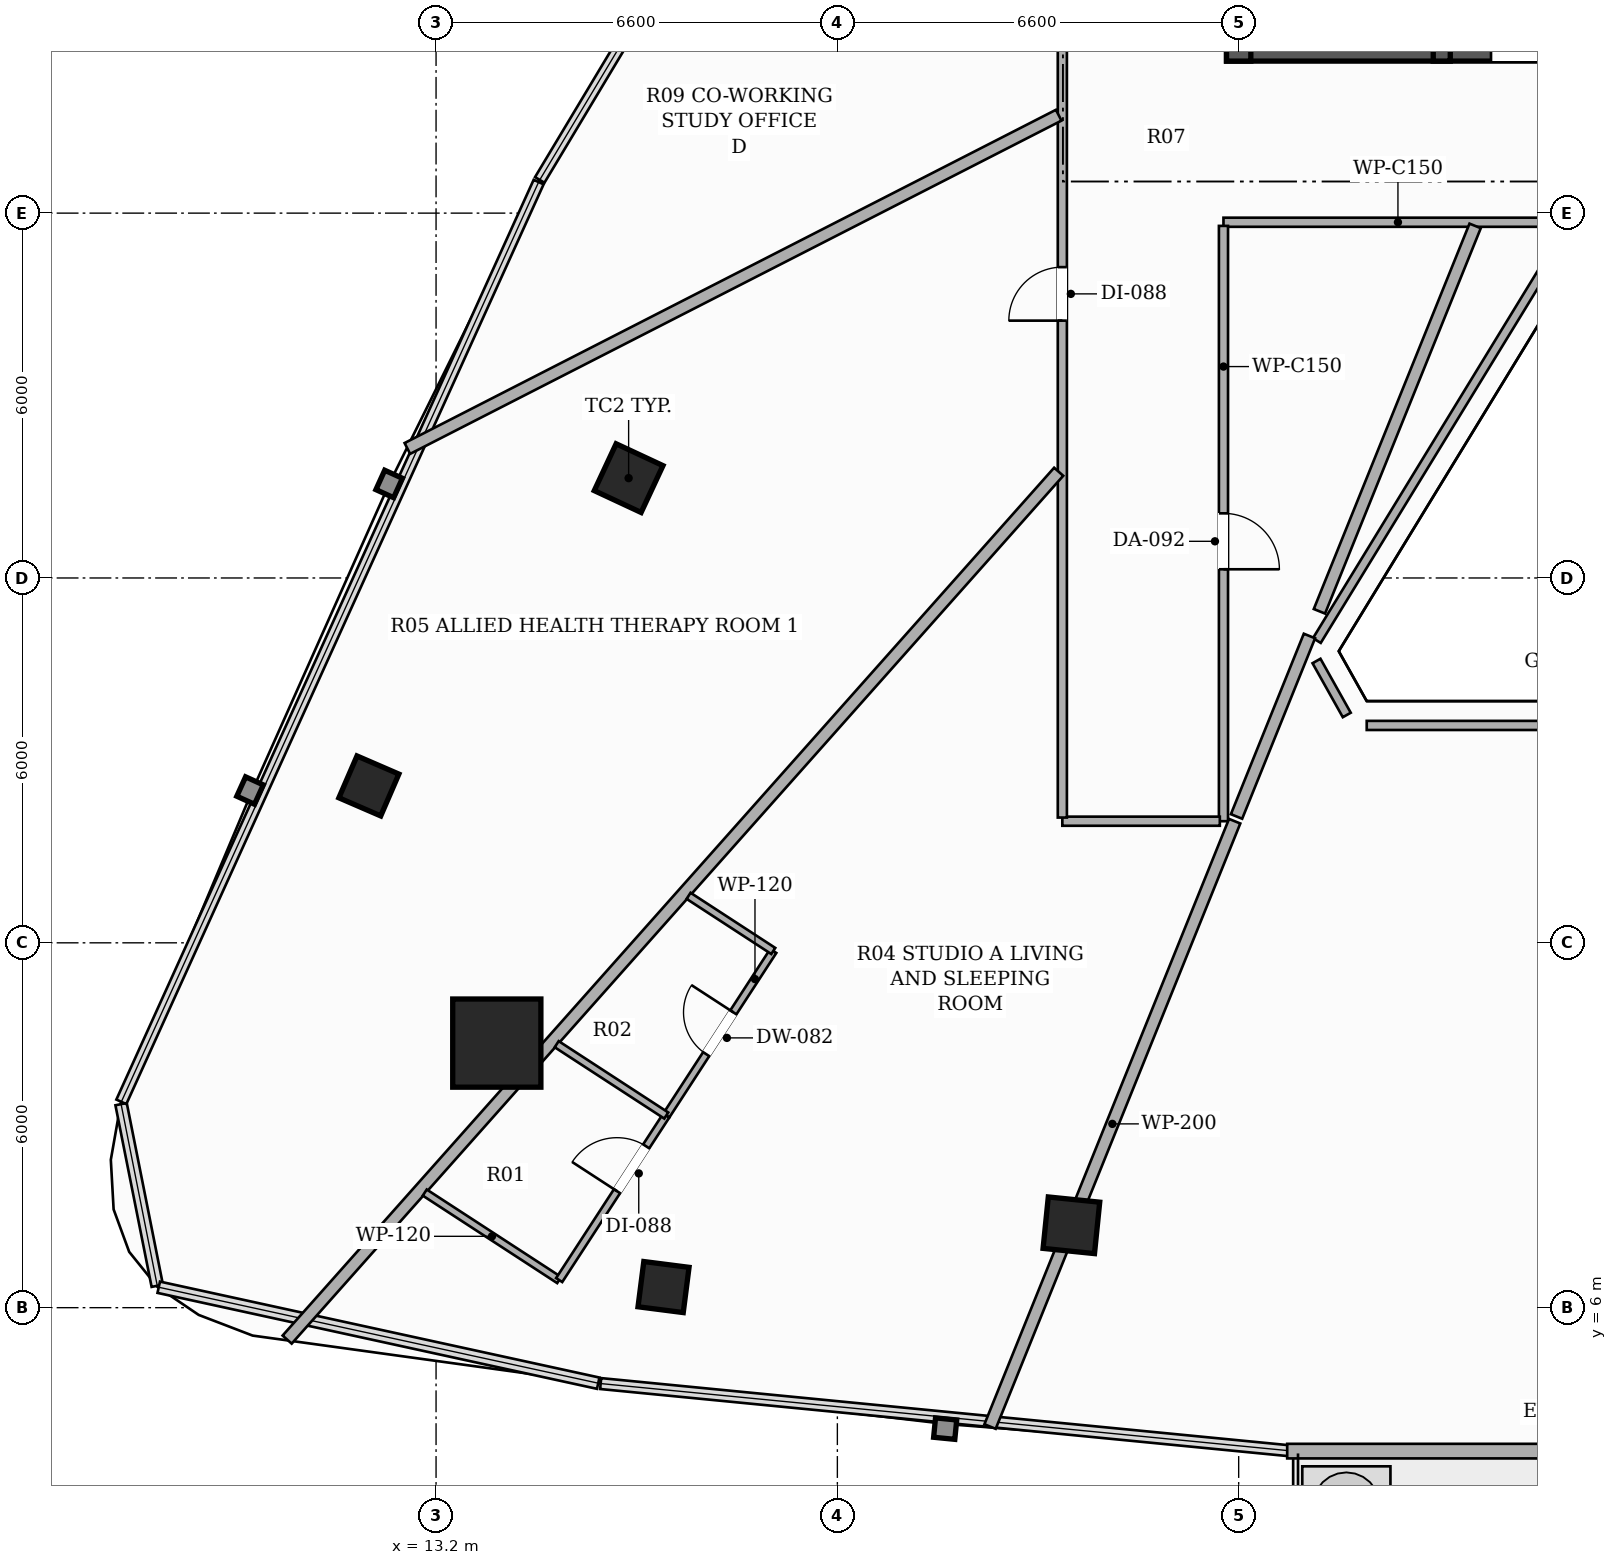
"""IFC4 building model, lengths in metres.
Left out: names, types, materials, properties, quantities, classifications, styles, units other than length and angle.
Written with IfcOpenShell. Run it as: python <this file> out.ifc"""

import sys

from ifc_helpers import new_model, si_unit, direction, frame, frame_2d, origin, origin_2d, place, context, subcontext, project, spatial, rectangle, hollow_rectangle, extrude, element, fill, save


model = new_model("IFC4")
c1 = context("Model", 3, precision=1e-05, world=origin(), true_north=direction((0.0, 1.0)))
c2 = subcontext(c1, "Body", "Model", "MODEL_VIEW")
j1 = project(units=[si_unit("LENGTHUNIT", "METRE"), si_unit("PLANEANGLEUNIT", "RADIAN")], contexts=[c1])
p1 = place(None, origin())
s1 = spatial("IfcSite", under=j1, at=p1, CompositionType="ELEMENT")
p2 = place(p1, origin())
s2 = spatial("IfcBuilding", under=s1, at=p2, CompositionType="ELEMENT")
p3 = place(p2, frame((0.0, 0.0, 150.65)))
s3 = spatial("IfcBuildingStorey", under=s2, at=p3, CompositionType="ELEMENT", Elevation=150.65)
p4 = place(p3, frame((26.2, 26.7, 0.0), z_axis=(0.0, 0.0, 1.0), x_axis=(1.0, 0.0, 0.0)))
e1 = element("IfcWall", 1, at=p4, inside=s3, PredefinedType="SHEAR", context=c2, shape_type="SweptSolid", body=[
    extrude(rectangle(XDim=13.6, YDim=0.4, at=frame_2d((6.8, 0.0))), origin(), (0.0, 0.0, 1.0), 3.3),
])
p5 = place(p4, frame((4.35, 0.0, 0.0)))
e2 = element("IfcOpeningElement", 2, at=p5, cuts=e1, PredefinedType="OPENING", context=c2, shape_type="SweptSolid", body=[
    extrude(rectangle(XDim=1.05, YDim=2.15, at=frame_2d((0.525, 1.075))), frame((0.0, 0.21, 0.0), z_axis=(0.0, -1.0, 0.0), x_axis=(1.0, 0.0, 0.0)), (0.0, 0.0, 1.0), 0.42),
])
p6 = place(p4, frame((8.3, 0.0, 0.0)))
e3 = element("IfcOpeningElement", 3, at=p6, cuts=e1, PredefinedType="OPENING", context=c2, shape_type="SweptSolid", body=[
    extrude(rectangle(XDim=1.05, YDim=2.15, at=frame_2d((0.525, 1.075))), frame((0.0, 0.21, 0.0), z_axis=(0.0, -1.0, 0.0), x_axis=(1.0, 0.0, 0.0)), (0.0, 0.0, 1.0), 0.42),
])
p7 = place(p3, frame((26.4, 26.5, 0.0), z_axis=(0.0, 0.0, 1.0), x_axis=(0.0, 1.0, 0.0)))
e4 = element("IfcWall", 4, at=p7, inside=s3, PredefinedType="SHEAR", context=c2, shape_type="SweptSolid", body=[
    extrude(rectangle(XDim=7.6, YDim=0.4, at=frame_2d((3.8, 0.0))), origin(), (0.0, 0.0, 1.0), 3.3),
])
p8 = place(p3, frame((29.74, 26.5, 0.0), z_axis=(0.0, 0.0, 1.0), x_axis=(0.0, 1.0, 0.0)))
e5 = element("IfcWall", 5, at=p8, inside=s3, PredefinedType="SHEAR", context=c2, shape_type="SweptSolid", body=[
    extrude(rectangle(XDim=8.15, YDim=0.28, at=frame_2d((4.075, 0.0))), origin(), (0.0, 0.0, 1.0), 3.3),
])
p9 = place(p8, frame((0.6, 0.0, 0.0)))
e6 = element("IfcOpeningElement", 6, at=p9, cuts=e5, PredefinedType="OPENING", context=c2, shape_type="SweptSolid", body=[
    extrude(rectangle(XDim=1.05, YDim=2.15, at=frame_2d((0.525, 1.075))), frame((0.0, 0.15, 0.0), z_axis=(0.0, -1.0, 0.0), x_axis=(1.0, 0.0, 0.0)), (0.0, 0.0, 1.0), 0.3),
])
p10 = place(p3, frame((14.199, 10.351, 0.0), z_axis=(0.0, 0.0, 1.0), x_axis=(1.0, 0.0, 0.0)))
e7 = element("IfcColumn", 7, at=p10, inside=s3, PredefinedType="COLUMN", context=c2, shape_type="SweptSolid", body=[
    extrude(hollow_rectangle(XDim=1.45, YDim=1.45, WallThickness=0.045, at=origin_2d()), origin(), (0.0, 0.0, 1.0), 3.3),
])
for number, where, z_axis, x_axis in (
    (8, (16.367, 19.642, 0.0), (0.0, 0.0, 1.0), (0.423, 0.906, 0.0)),
    (9, (23.649, 7.355, 0.0), (0.0, 0.0, 1.0), (-0.995, 0.101, 0.0)),
):
    element("IfcColumn", number, at=place(p3, frame(where, z_axis=z_axis, x_axis=x_axis)), inside=s3, PredefinedType="COLUMN", context=c2, shape_type="SweptSolid", body=[
        extrude(hollow_rectangle(XDim=0.85, YDim=0.85, WallThickness=0.028, at=origin_2d()), origin(), (0.0, 0.0, 1.0), 3.3),
    ])
for number, where, z_axis, x_axis in (
    (10, (12.095, 14.58, 0.0), (0.0, 0.0, 1.0), (0.397, 0.918, 0.0)),
    (11, (16.941, 6.339, 0.0), (0.0, 0.0, 1.0), (-0.992, 0.127, 0.0)),
):
    element("IfcColumn", number, at=place(p3, frame(where, z_axis=z_axis, x_axis=x_axis)), inside=s3, PredefinedType="COLUMN", context=c2, shape_type="SweptSolid", body=[
        extrude(hollow_rectangle(XDim=0.75, YDim=0.75, WallThickness=0.025, at=origin_2d()), origin(), (0.0, 0.0, 1.0), 3.3),
    ])
p11 = place(p3, frame((27.198, 3.641, 0.0), z_axis=(0.0, 0.0, 1.0), x_axis=(1.0, 0.0, 0.0)))
e12 = element("IfcWall", 12, at=p11, inside=s3, PredefinedType="SOLIDWALL", context=c2, shape_type="SweptSolid", body=[
    extrude(rectangle(XDim=11.604, YDim=0.24, at=frame_2d((5.802, 0.0))), origin(), (0.0, 0.0, 1.0), 2.624),
])
p12 = place(p11, frame((9.107, 0.0, 0.0)))
e13 = element("IfcOpeningElement", 13, at=p12, cuts=e12, PredefinedType="OPENING", context=c2, shape_type="SweptSolid", body=[
    extrude(rectangle(XDim=1.8, YDim=2.2, at=frame_2d((0.9, 1.1))), frame((0.0, 0.13, 0.0), z_axis=(0.0, -1.0, 0.0), x_axis=(1.0, 0.0, 0.0)), (0.0, 0.0, 1.0), 0.26),
])
p13 = place(p3, frame((31.889, 23.85, 0.0), z_axis=(0.0, 0.0, 1.0), x_axis=(-1.0, 0.0, 0.0)))
e14 = element("IfcWall", 14, at=p13, inside=s3, PredefinedType="PARTITIONING", context=c2, shape_type="SweptSolid", body=[
    extrude(rectangle(XDim=5.739, YDim=0.15, at=frame_2d((2.87, 0.0))), origin(), (0.0, 0.0, 1.0), 2.721),
])
p14 = place(p3, frame((26.15, 23.79, 0.0), z_axis=(0.0, 0.0, 1.0), x_axis=(0.0, -1.0, 0.0)))
e15 = element("IfcWall", 15, at=p14, inside=s3, PredefinedType="PARTITIONING", context=c2, shape_type="SweptSolid", body=[
    extrude(rectangle(XDim=9.79, YDim=0.15, at=frame_2d((4.895, 0.0))), origin(), (0.0, 0.0, 1.0), 2.721),
])
p15 = place(p14, frame((4.727, 0.0, 0.0)))
e16 = element("IfcOpeningElement", 16, at=p15, cuts=e15, PredefinedType="OPENING", context=c2, shape_type="SweptSolid", body=[
    extrude(rectangle(XDim=0.92, YDim=2.15, at=frame_2d((0.46, 1.075))), frame((0.0, 0.085, 0.0), z_axis=(0.0, -1.0, 0.0), x_axis=(1.0, 0.0, 0.0)), (0.0, 0.0, 1.0), 0.17),
])
p16 = place(p3, frame((26.09, 14.0, 0.0), z_axis=(0.0, 0.0, 1.0), x_axis=(-1.0, 0.0, 0.0)))
e17 = element("IfcWall", 17, at=p16, inside=s3, PredefinedType="PARTITIONING", context=c2, shape_type="SweptSolid", body=[
    extrude(rectangle(XDim=2.59, YDim=0.15, at=frame_2d((1.295, 0.0))), origin(), (0.0, 0.0, 1.0), 2.721),
])
p17 = place(p3, frame((23.5, 14.06, 0.0), z_axis=(0.0, 0.0, 1.0), x_axis=(0.0, 1.0, 0.0)))
e18 = element("IfcWall", 18, at=p17, inside=s3, PredefinedType="PARTITIONING", context=c2, shape_type="SweptSolid", body=[
    extrude(rectangle(XDim=22.84, YDim=0.15, at=frame_2d((11.42, 0.0))), origin(), (0.0, 0.0, 1.0), 2.413),
])
p18 = place(p17, frame((8.172, 0.0, 0.0)))
e19 = element("IfcOpeningElement", 19, at=p18, cuts=e18, PredefinedType="OPENING", context=c2, shape_type="SweptSolid", body=[
    extrude(rectangle(XDim=0.88, YDim=2.1, at=frame_2d((0.44, 1.05))), frame((0.0, 0.085, 0.0), z_axis=(0.0, -1.0, 0.0), x_axis=(1.0, 0.0, 0.0)), (0.0, 0.0, 1.0), 0.17),
])
p19 = place(p17, frame((20.969, 0.0, 0.0)))
e20 = element("IfcOpeningElement", 20, at=p19, cuts=e18, PredefinedType="OPENING", context=c2, shape_type="SweptSolid", body=[
    extrude(rectangle(XDim=0.88, YDim=2.1, at=frame_2d((0.44, 1.05))), frame((0.0, 0.085, 0.0), z_axis=(0.0, -1.0, 0.0), x_axis=(1.0, 0.0, 0.0)), (0.0, 0.0, 1.0), 0.17),
])
p20 = place(p17, frame((15.484, 0.0, 0.0)))
e21 = element("IfcOpeningElement", 21, at=p20, cuts=e18, PredefinedType="OPENING", context=c2, shape_type="SweptSolid", body=[
    extrude(rectangle(XDim=0.88, YDim=2.1, at=frame_2d((0.44, 1.05))), frame((0.0, 0.085, 0.0), z_axis=(0.0, -1.0, 0.0), x_axis=(1.0, 0.0, 0.0)), (0.0, 0.0, 1.0), 0.17),
])
p21 = place(p3, frame((37.493, 15.575, 0.0), z_axis=(0.0, 0.0, 1.0), x_axis=(-1.0, 0.0, 0.0)))
e22 = element("IfcWall", 22, at=p21, inside=s3, PredefinedType="PARTITIONING", context=c2, shape_type="SweptSolid", body=[
    extrude(rectangle(XDim=8.987, YDim=0.15, at=frame_2d((4.493, 0.0))), origin(), (0.0, 0.0, 1.0), 2.721),
])
p22 = place(p3, frame((28.178, 15.747, 0.0), z_axis=(0.0, 0.0, 1.0), x_axis=(-0.489202035948, 0.872170492521, 0.0)))
e23 = element("IfcWall", 23, at=p22, inside=s3, PredefinedType="PARTITIONING", context=c2, shape_type="SweptSolid", body=[
    extrude(rectangle(XDim=1.018, YDim=0.15, at=frame_2d((0.509, 0.0))), origin(), (0.0, 0.0, 1.0), 3.06),
])
p23 = place(p3, frame((27.686, 16.971, 0.0), z_axis=(0.0, 0.0, 1.0), x_axis=(0.521873666917, 0.853022787374, 0.0)))
e24 = element("IfcWall", 24, at=p23, inside=s3, PredefinedType="PARTITIONING", context=c2, shape_type="SweptSolid", body=[
    extrude(rectangle(XDim=7.994, YDim=0.15, at=frame_2d((3.997, 0.0))), origin(), (0.0, 0.0, 1.0), 2.721),
])
p24 = place(p3, frame((22.311, 4.045, 0.0), z_axis=(0.0, 0.0, 1.0), x_axis=(0.374673572515, 0.92715679044, 0.0)))
e25 = element("IfcWall", 25, at=p24, inside=s3, PredefinedType="PARTITIONING", context=c2, shape_type="SweptSolid", body=[
    extrude(rectangle(XDim=10.737, YDim=0.2, at=frame_2d((5.369, 0.0))), origin(), (0.0, 0.0, 1.0), 2.413),
])
p25 = place(p3, frame((26.365, 14.078, 0.0), z_axis=(0.0, 0.0, 1.0), x_axis=(0.374557626207, 0.927203637099, 0.0)))
e26 = element("IfcWall", 26, at=p25, inside=s3, PredefinedType="PARTITIONING", context=c2, shape_type="SweptSolid", body=[
    extrude(rectangle(XDim=3.201, YDim=0.2, at=frame_2d((1.601, 0.0))), origin(), (0.0, 0.0, 1.0), 3.06),
])
p26 = place(p3, frame((27.728, 17.452, 0.0), z_axis=(0.0, 0.0, 1.0), x_axis=(0.374639602714, 0.927170517261, 0.0)))
e27 = element("IfcWall", 27, at=p26, inside=s3, PredefinedType="PARTITIONING", context=c2, shape_type="SweptSolid", body=[
    extrude(rectangle(XDim=6.836, YDim=0.2, at=frame_2d((3.418, 0.0))), origin(), (0.0, 0.0, 1.0), 2.721),
])
p27 = place(p3, frame((23.44, 19.747, 0.0), z_axis=(0.0, 0.0, 1.0), x_axis=(-0.664444771995, -0.747337370248, 0.0)))
e28 = element("IfcWall", 28, at=p27, inside=s3, PredefinedType="PARTITIONING", context=c2, shape_type="SweptSolid", body=[
    extrude(rectangle(XDim=19.097, YDim=0.2, at=frame_2d((9.549, 0.0))), origin(), (0.0, 0.0, 1.0), 2.413),
])
p28 = place(p3, frame((12.728, 20.13, 0.0), z_axis=(0.0, 0.0, 1.0), x_axis=(0.890257920911, 0.455456731486, 0.0)))
e29 = element("IfcWall", 29, at=p28, inside=s3, PredefinedType="PARTITIONING", context=c2, shape_type="SweptSolid", body=[
    extrude(rectangle(XDim=12.032, YDim=0.2, at=frame_2d((6.016, 0.0))), origin(), (0.0, 0.0, 1.0), 2.413),
])
p29 = place(p3, frame((16.986, 9.16, 0.0), z_axis=(0.0, 0.0, 1.0), x_axis=(0.545222266406, 0.8382915246, 0.0)))
e30 = element("IfcWall", 30, at=p29, inside=s3, PredefinedType="PARTITIONING", context=c2, shape_type="SweptSolid", body=[
    extrude(rectangle(XDim=3.228, YDim=0.12, at=frame_2d((1.614, 0.0))), origin(), (0.0, 0.0, 1.0), 3.06),
])
p30 = place(p29, frame((1.204, 0.0, 0.0)))
e31 = element("IfcOpeningElement", 31, at=p30, cuts=e30, PredefinedType="OPENING", context=c2, shape_type="SweptSolid", body=[
    extrude(rectangle(XDim=0.82, YDim=2.1, at=frame_2d((0.41, 1.05))), frame((0.0, 0.07, 0.0), z_axis=(0.0, -1.0, 0.0), x_axis=(1.0, 0.0, 0.0)), (0.0, 0.0, 1.0), 0.14),
])
p31 = place(p3, frame((18.746, 11.866, 0.0), z_axis=(0.0, 0.0, 1.0), x_axis=(-0.838034005253, 0.545618003771, 0.0)))
e32 = element("IfcWall", 32, at=p31, inside=s3, PredefinedType="PARTITIONING", context=c2, shape_type="SweptSolid", body=[
    extrude(rectangle(XDim=1.662, YDim=0.12, at=frame_2d((0.831, 0.0))), origin(), (0.0, 0.0, 1.0), 3.06),
])
p32 = place(p3, frame((13.014, 7.893, 0.0), z_axis=(0.0, 0.0, 1.0), x_axis=(0.838149605573, -0.545440407999, 0.0)))
e33 = element("IfcWall", 33, at=p32, inside=s3, PredefinedType="PARTITIONING", context=c2, shape_type="SweptSolid", body=[
    extrude(rectangle(XDim=2.638, YDim=0.12, at=frame_2d((1.319, 0.0))), origin(), (0.0, 0.0, 1.0), 3.06),
])
p33 = place(p3, frame((15.225, 6.454, 0.0), z_axis=(0.0, 0.0, 1.0), x_axis=(0.54546937792, 0.838130752181, 0.0)))
e34 = element("IfcWall", 34, at=p33, inside=s3, PredefinedType="PARTITIONING", context=c2, shape_type="SweptSolid", body=[
    extrude(rectangle(XDim=3.228, YDim=0.12, at=frame_2d((1.614, 0.0))), origin(), (0.0, 0.0, 1.0), 2.413),
])
p34 = place(p33, frame((1.744, 0.0, 0.0)))
e35 = element("IfcOpeningElement", 35, at=p34, cuts=e34, PredefinedType="OPENING", context=c2, shape_type="SweptSolid", body=[
    extrude(rectangle(XDim=0.88, YDim=2.1, at=frame_2d((0.44, 1.05))), frame((0.0, 0.07, 0.0), z_axis=(0.0, -1.0, 0.0), x_axis=(1.0, 0.0, 0.0)), (0.0, 0.0, 1.0), 0.14),
])
p35 = place(p3, frame((16.986, 9.16, 0.0), z_axis=(0.0, 0.0, 1.0), x_axis=(-0.838062073647, 0.545574890106, 0.0)))
e36 = element("IfcWall", 36, at=p35, inside=s3, PredefinedType="PARTITIONING", context=c2, shape_type="SweptSolid", body=[
    extrude(rectangle(XDim=2.15, YDim=0.12, at=frame_2d((1.075, 0.0))), origin(), (0.0, 0.0, 1.0), 3.06),
])
p36 = place(p18, origin())
e37 = element("IfcDoor", 37, at=p36, inside=s3, OperationType="SINGLE_SWING_LEFT", PredefinedType="DOOR", context=c2, shape_type="SweptSolid", body=[
    extrude(rectangle(XDim=0.88, YDim=2.1, at=frame_2d((0.44, 1.05))), frame((0.0, 0.025, 0.0), z_axis=(0.0, -1.0, 0.0), x_axis=(1.0, 0.0, 0.0)), (0.0, 0.0, 1.0), 0.05),
])
fill(e19, e37)
p37 = place(p15, origin())
e38 = element("IfcDoor", 38, at=p37, inside=s3, OperationType="SINGLE_SWING_RIGHT", PredefinedType="DOOR", context=c2, shape_type="SweptSolid", body=[
    extrude(rectangle(XDim=0.92, YDim=2.15, at=frame_2d((0.46, 1.075))), frame((0.0, 0.025, 0.0), z_axis=(0.0, -1.0, 0.0), x_axis=(1.0, 0.0, 0.0)), (0.0, 0.0, 1.0), 0.05),
])
fill(e16, e38)
p38 = place(p30, origin())
e39 = element("IfcDoor", 39, at=p38, inside=s3, OperationType="SINGLE_SWING_RIGHT", PredefinedType="DOOR", context=c2, shape_type="SweptSolid", body=[
    extrude(rectangle(XDim=0.82, YDim=2.1, at=frame_2d((0.41, 1.05))), frame((0.0, 0.025, 0.0), z_axis=(0.0, -1.0, 0.0), x_axis=(1.0, 0.0, 0.0)), (0.0, 0.0, 1.0), 0.05),
])
fill(e31, e39)
p39 = place(p34, origin())
e40 = element("IfcDoor", 40, at=p39, inside=s3, OperationType="SINGLE_SWING_LEFT", PredefinedType="DOOR", context=c2, shape_type="SweptSolid", body=[
    extrude(rectangle(XDim=0.88, YDim=2.1, at=frame_2d((0.44, 1.05))), frame((0.0, 0.025, 0.0), z_axis=(0.0, -1.0, 0.0), x_axis=(1.0, 0.0, 0.0)), (0.0, 0.0, 1.0), 0.05),
])
fill(e35, e40)
save(model, sys.argv[1])
